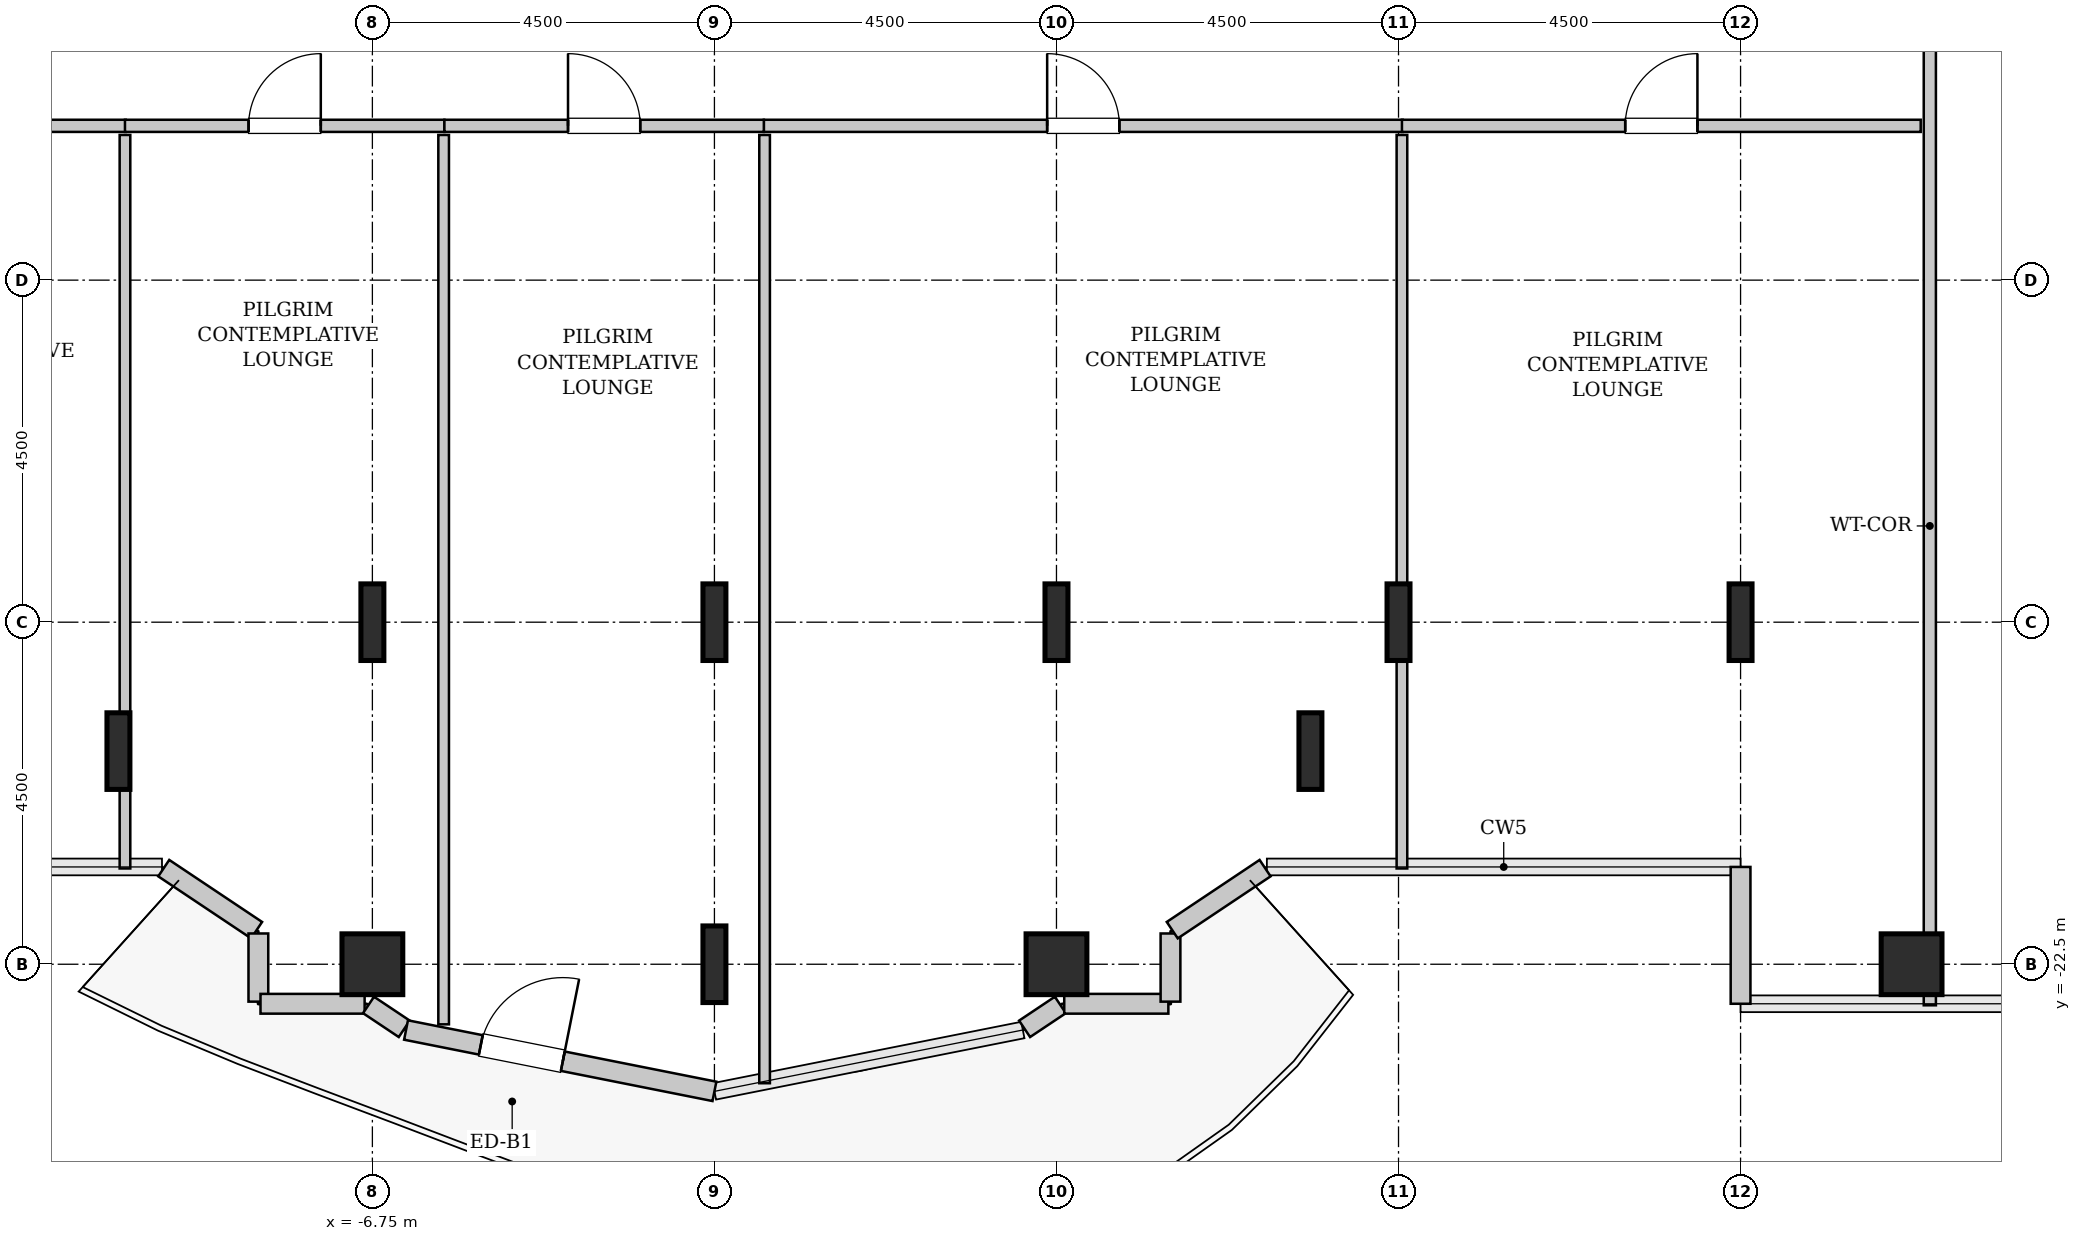
"""IFC4 building model, lengths in metres.
Left out: names, types, materials, properties, quantities, classifications, styles, units other than length and angle.
Written with IfcOpenShell. Run it as: python <this file> out.ifc"""

import sys

from ifc_helpers import new_model, si_unit, direction, frame, frame_2d, origin, origin_2d, place, context, subcontext, project, spatial, rectangle, hollow_rectangle, i_section, extrude, source, transform, mapped, element, fill, save


model = new_model("IFC4")
c1 = context("Model", 3, precision=1e-05, world=origin(), true_north=direction((0.0, 1.0)))
c2 = subcontext(c1, "Body", "Model", "MODEL_VIEW")
j1 = project(units=[si_unit("LENGTHUNIT", "METRE"), si_unit("PLANEANGLEUNIT", "RADIAN")], contexts=[c1])
p1 = place(None, origin())
s1 = spatial("IfcSite", under=j1, at=p1, CompositionType="ELEMENT")
p2 = place(p1, origin())
s2 = spatial("IfcBuilding", under=s1, at=p2, CompositionType="ELEMENT")
p3 = place(p2, frame((0.0, 0.0, 136.4)))
s3 = spatial("IfcBuildingStorey", under=s2, at=p3, CompositionType="ELEMENT", Elevation=136.4)
m1 = source(origin(), c2, "Body", "SweptSolid", [
    extrude(i_section(OverallWidth=0.302, OverallDepth=1.008, WebThickness=0.021, FlangeThickness=0.04, FilletRadius=0.03, at=origin_2d()), origin(), (0.0, 0.0, 1.0), 3.8),
])
p4 = place(p3, frame((-10.091, -19.696, 0.0), z_axis=(0.0, 0.0, 1.0), x_axis=(1.0, 0.0, 0.0)))
e1 = element("IfcColumn", 1, at=p4, inside=s3, PredefinedType="COLUMN", context=c2, shape_type="MappedRepresentation", body=[
    mapped(m1, transform((0.0, 0.0, 0.0), x_axis=(1.0, 0.0, 0.0), y_axis=(0.0, 1.0, 0.0), z_axis=(0.0, 0.0, 1.0), scale=1.0)),
])
m2 = source(origin(), c2, "Body", "SweptSolid", [
    extrude(hollow_rectangle(XDim=0.8, YDim=0.8, WallThickness=0.04, InnerFilletRadius=0.04, OuterFilletRadius=0.08, at=origin_2d()), origin(), (0.0, 0.0, 1.0), 3.8),
])
p5 = place(p3, frame((-6.75, -22.5, 0.0), z_axis=(0.0, 0.0, 1.0), x_axis=(1.0, 0.0, 0.0)))
e2 = element("IfcColumn", 2, at=p5, inside=s3, PredefinedType="COLUMN", context=c2, shape_type="MappedRepresentation", body=[
    mapped(m2, transform((0.0, 0.0, 0.0), x_axis=(1.0, 0.0, 0.0), y_axis=(0.0, 1.0, 0.0), z_axis=(0.0, 0.0, 1.0), scale=1.0)),
])
for number, where, z_axis, x_axis in (
    (3, (-6.75, -18.0, 0.0), (0.0, 0.0, 1.0), (1.0, 0.0, 0.0)),
    (4, (-2.25, -22.5, 0.0), (0.0, 0.0, 1.0), (1.0, 0.0, 0.0)),
    (5, (-2.25, -18.0, 0.0), (0.0, 0.0, 1.0), (1.0, 0.0, 0.0)),
):
    element("IfcColumn", number, at=place(p3, frame(where, z_axis=z_axis, x_axis=x_axis)), inside=s3, PredefinedType="COLUMN", context=c2, shape_type="MappedRepresentation", body=[
        mapped(m1, transform((0.0, 0.0, 0.0), x_axis=(1.0, 0.0, 0.0), y_axis=(0.0, 1.0, 0.0), z_axis=(0.0, 0.0, 1.0), scale=1.0)),
    ])
p6 = place(p3, frame((2.25, -22.5, 0.0), z_axis=(0.0, 0.0, 1.0), x_axis=(1.0, 0.0, 0.0)))
e6 = element("IfcColumn", 6, at=p6, inside=s3, PredefinedType="COLUMN", context=c2, shape_type="MappedRepresentation", body=[
    mapped(m2, transform((0.0, 0.0, 0.0), x_axis=(1.0, 0.0, 0.0), y_axis=(0.0, 1.0, 0.0), z_axis=(0.0, 0.0, 1.0), scale=1.0)),
])
for number, where, z_axis, x_axis in (
    (7, (2.25, -18.0, 0.0), (0.0, 0.0, 1.0), (1.0, 0.0, 0.0)),
    (8, (5.591, -19.696, 0.0), (0.0, 0.0, 1.0), (1.0, 0.0, 0.0)),
    (9, (6.75, -18.0, 0.0), (0.0, 0.0, 1.0), (1.0, 0.0, 0.0)),
    (10, (11.25, -18.0, 0.0), (0.0, 0.0, 1.0), (1.0, 0.0, 0.0)),
):
    element("IfcColumn", number, at=place(p3, frame(where, z_axis=z_axis, x_axis=x_axis)), inside=s3, PredefinedType="COLUMN", context=c2, shape_type="MappedRepresentation", body=[
        mapped(m1, transform((0.0, 0.0, 0.0), x_axis=(1.0, 0.0, 0.0), y_axis=(0.0, 1.0, 0.0), z_axis=(0.0, 0.0, 1.0), scale=1.0)),
    ])
p7 = place(p3, frame((13.5, -22.5, 0.0), z_axis=(0.0, 0.0, 1.0), x_axis=(1.0, 0.0, 0.0)))
e11 = element("IfcColumn", 11, at=p7, inside=s3, PredefinedType="COLUMN", context=c2, shape_type="MappedRepresentation", body=[
    mapped(m2, transform((0.0, 0.0, 0.0), x_axis=(1.0, 0.0, 0.0), y_axis=(0.0, 1.0, 0.0), z_axis=(0.0, 0.0, 1.0), scale=1.0)),
])
m3 = source(origin(), c2, "Body", "SweptSolid", [
    extrude(rectangle(XDim=1.8, YDim=0.26, at=frame_2d((0.9, 0.0))), origin(), (0.0, 0.0, 1.0), 3.55),
])
p8 = place(p3, frame((11.25, -21.22, 0.0), z_axis=(0.0, 0.0, 1.0), x_axis=(0.0, -1.0, 0.0)))
e12 = element("IfcWall", 12, at=p8, inside=s3, PredefinedType="SOLIDWALL", context=c2, shape_type="MappedRepresentation", body=[
    mapped(m3, transform((0.0, 0.0, 0.0), x_axis=(1.0, 0.0, 0.0), y_axis=(0.0, 1.0, 0.0), z_axis=(0.0, 0.0, 1.0), scale=1.0)),
])
m4 = source(origin(), c2, "Body", "SweptSolid", [
    extrude(rectangle(XDim=1.469, YDim=0.26, at=frame_2d((0.734, 0.0))), origin(), (0.0, 0.0, 1.0), 3.55),
])
p9 = place(p3, frame((-9.495, -21.236, 0.0), z_axis=(0.0, 0.0, 1.0), x_axis=(0.831461760506, -0.555581983884, 0.0)))
e13 = element("IfcWall", 13, at=p9, inside=s3, PredefinedType="SOLIDWALL", context=c2, shape_type="MappedRepresentation", body=[
    mapped(m4, transform((0.0, 0.0, 0.0), x_axis=(1.0, 0.0, 0.0), y_axis=(0.0, 1.0, 0.0), z_axis=(0.0, 0.0, 1.0), scale=1.0)),
])
m5 = source(origin(), c2, "Body", "SweptSolid", [
    extrude(rectangle(XDim=0.897, YDim=0.26, at=frame_2d((0.448, 0.0))), origin(), (0.0, 0.0, 1.0), 3.55),
])
p10 = place(p3, frame((-8.25, -22.095, 0.0), z_axis=(0.0, 0.0, 1.0), x_axis=(0.0, -1.0, 0.0)))
e14 = element("IfcWall", 14, at=p10, inside=s3, PredefinedType="SOLIDWALL", context=c2, shape_type="MappedRepresentation", body=[
    mapped(m5, transform((0.0, 0.0, 0.0), x_axis=(1.0, 0.0, 0.0), y_axis=(0.0, 1.0, 0.0), z_axis=(0.0, 0.0, 1.0), scale=1.0)),
])
m6 = source(origin(), c2, "Body", "SweptSolid", [
    extrude(rectangle(XDim=1.37, YDim=0.26, at=frame_2d((0.685, 0.0))), origin(), (0.0, 0.0, 1.0), 3.55),
])
p11 = place(p3, frame((-8.222, -23.02, 0.0), z_axis=(0.0, 0.0, 1.0), x_axis=(1.0, 0.0, 0.0)))
e15 = element("IfcWall", 15, at=p11, inside=s3, PredefinedType="SOLIDWALL", context=c2, shape_type="MappedRepresentation", body=[
    mapped(m6, transform((0.0, 0.0, 0.0), x_axis=(1.0, 0.0, 0.0), y_axis=(0.0, 1.0, 0.0), z_axis=(0.0, 0.0, 1.0), scale=1.0)),
])
m7 = source(origin(), c2, "Body", "SweptSolid", [
    extrude(rectangle(XDim=0.565, YDim=0.26, at=frame_2d((0.283, 0.0))), origin(), (0.0, 0.0, 1.0), 3.55),
])
p12 = place(p3, frame((-6.801, -23.036, 0.0), z_axis=(0.0, 0.0, 1.0), x_axis=(0.831651492666, -0.555297933317, 0.0)))
e16 = element("IfcWall", 16, at=p12, inside=s3, PredefinedType="SOLIDWALL", context=c2, shape_type="MappedRepresentation", body=[
    mapped(m7, transform((0.0, 0.0, 0.0), x_axis=(1.0, 0.0, 0.0), y_axis=(0.0, 1.0, 0.0), z_axis=(0.0, 0.0, 1.0), scale=1.0)),
])
m8 = source(origin(), c2, "Body", "SweptSolid", [
    extrude(rectangle(XDim=4.137, YDim=0.26, at=frame_2d((2.068, 0.0))), origin(), (0.0, 0.0, 1.0), 3.55),
])
p13 = place(p3, frame((-6.307, -23.365, 0.0), z_axis=(0.0, 0.0, 1.0), x_axis=(0.980782170794, -0.195105954428, 0.0)))
e17 = element("IfcWall", 17, at=p13, inside=s3, PredefinedType="SOLIDWALL", context=c2, shape_type="MappedRepresentation", body=[
    mapped(m8, transform((0.0, 0.0, 0.0), x_axis=(1.0, 0.0, 0.0), y_axis=(0.0, 1.0, 0.0), z_axis=(0.0, 0.0, 1.0), scale=1.0)),
])
p14 = place(p13, frame((1.003, 0.0, 0.0)))
e18 = element("IfcOpeningElement", 18, at=p14, cuts=e17, PredefinedType="OPENING", context=c2, shape_type="SweptSolid", body=[
    extrude(rectangle(XDim=1.1, YDim=2.2, at=frame_2d((0.55, 1.1))), frame((0.0, 0.14, 0.0), z_axis=(0.0, -1.0, 0.0), x_axis=(1.0, 0.0, 0.0)), (0.0, 0.0, 1.0), 0.28),
])
p15 = place(p3, frame((1.831, -23.35, 0.0), z_axis=(0.0, 0.0, 1.0), x_axis=(0.831651492666, 0.555297933317, 0.0)))
e19 = element("IfcWall", 19, at=p15, inside=s3, PredefinedType="SOLIDWALL", context=c2, shape_type="MappedRepresentation", body=[
    mapped(m7, transform((0.0, 0.0, 0.0), x_axis=(1.0, 0.0, 0.0), y_axis=(0.0, 1.0, 0.0), z_axis=(0.0, 0.0, 1.0), scale=1.0)),
])
p16 = place(p3, frame((2.352, -23.02, 0.0), z_axis=(0.0, 0.0, 1.0), x_axis=(1.0, 0.0, 0.0)))
e20 = element("IfcWall", 20, at=p16, inside=s3, PredefinedType="SOLIDWALL", context=c2, shape_type="MappedRepresentation", body=[
    mapped(m6, transform((0.0, 0.0, 0.0), x_axis=(1.0, 0.0, 0.0), y_axis=(0.0, 1.0, 0.0), z_axis=(0.0, 0.0, 1.0), scale=1.0)),
])
p17 = place(p3, frame((3.75, -22.992, 0.0), z_axis=(0.0, 0.0, 1.0), x_axis=(0.0, 1.0, 0.0)))
e21 = element("IfcWall", 21, at=p17, inside=s3, PredefinedType="SOLIDWALL", context=c2, shape_type="MappedRepresentation", body=[
    mapped(m5, transform((0.0, 0.0, 0.0), x_axis=(1.0, 0.0, 0.0), y_axis=(0.0, 1.0, 0.0), z_axis=(0.0, 0.0, 1.0), scale=1.0)),
])
p18 = place(p3, frame((3.773, -22.052, 0.0), z_axis=(0.0, 0.0, 1.0), x_axis=(0.831461760506, 0.555581983884, 0.0)))
e22 = element("IfcWall", 22, at=p18, inside=s3, PredefinedType="SOLIDWALL", context=c2, shape_type="MappedRepresentation", body=[
    mapped(m4, transform((0.0, 0.0, 0.0), x_axis=(1.0, 0.0, 0.0), y_axis=(0.0, 1.0, 0.0), z_axis=(0.0, 0.0, 1.0), scale=1.0)),
])
m9 = source(origin(), c2, "Body", "SweptSolid", [
    extrude(rectangle(XDim=14.545, YDim=0.16, at=frame_2d((7.272, 0.0))), origin(), (0.0, 0.0, 1.0), 3.535),
])
p19 = place(p3, frame((13.74, -23.04, 0.0), z_axis=(0.0, 0.0, 1.0), x_axis=(0.0, 1.0, 0.0)))
e23 = element("IfcWall", 23, at=p19, inside=s3, PredefinedType="PARTITIONING", context=c2, shape_type="MappedRepresentation", body=[
    mapped(m9, transform((0.0, 0.0, 0.0), x_axis=(1.0, 0.0, 0.0), y_axis=(0.0, 1.0, 0.0), z_axis=(0.0, 0.0, 1.0), scale=1.0)),
])
p20 = place(p19, frame((12.562, 0.0, 0.0)))
e24 = element("IfcOpeningElement", 24, at=p20, cuts=e23, PredefinedType="OPENING", context=c2, shape_type="SweptSolid", body=[
    extrude(rectangle(XDim=0.95, YDim=2.1, at=frame_2d((0.475, 1.05))), frame((0.0, 0.09, 0.0), z_axis=(0.0, -1.0, 0.0), x_axis=(1.0, 0.0, 0.0)), (0.0, 0.0, 1.0), 0.18),
])
m10 = source(origin(), c2, "Body", "SweptSolid", [
    extrude(rectangle(XDim=3.625, YDim=0.16, at=frame_2d((1.812, 0.0))), origin(), (0.0, 0.0, 1.0), 3.535),
])
p21 = place(p3, frame((-13.62, -11.47, 0.0), z_axis=(0.0, 0.0, 1.0), x_axis=(1.0, 0.0, 0.0)))
e25 = element("IfcWall", 25, at=p21, inside=s3, PredefinedType="PARTITIONING", context=c2, shape_type="MappedRepresentation", body=[
    mapped(m10, transform((0.0, 0.0, 0.0), x_axis=(1.0, 0.0, 0.0), y_axis=(0.0, 1.0, 0.0), z_axis=(0.0, 0.0, 1.0), scale=1.0)),
])
p22 = place(p21, frame((1.337, 0.0, 0.0)))
e26 = element("IfcOpeningElement", 26, at=p22, cuts=e25, PredefinedType="OPENING", context=c2, shape_type="SweptSolid", body=[
    extrude(rectangle(XDim=0.95, YDim=2.1, at=frame_2d((0.475, 1.05))), frame((0.0, 0.09, 0.0), z_axis=(0.0, -1.0, 0.0), x_axis=(1.0, 0.0, 0.0)), (0.0, 0.0, 1.0), 0.18),
])
m11 = source(origin(), c2, "Body", "SweptSolid", [
    extrude(rectangle(XDim=9.65, YDim=0.14, at=frame_2d((4.825, 0.0))), origin(), (0.0, 0.0, 1.0), 3.535),
])
p23 = place(p3, frame((-10.005, -21.24, 0.0), z_axis=(0.0, 0.0, 1.0), x_axis=(0.0, 1.0, 0.0)))
e27 = element("IfcWall", 27, at=p23, inside=s3, PredefinedType="PARTITIONING", context=c2, shape_type="MappedRepresentation", body=[
    mapped(m11, transform((0.0, 0.0, 0.0), x_axis=(1.0, 0.0, 0.0), y_axis=(0.0, 1.0, 0.0), z_axis=(0.0, 0.0, 1.0), scale=1.0)),
])
m12 = source(origin(), c2, "Body", "SweptSolid", [
    extrude(rectangle(XDim=8.405, YDim=0.16, at=frame_2d((4.203, 0.0))), origin(), (0.0, 0.0, 1.0), 3.535),
])
p24 = place(p3, frame((-1.6, -11.47, 0.0), z_axis=(0.0, 0.0, 1.0), x_axis=(1.0, 0.0, 0.0)))
e28 = element("IfcWall", 28, at=p24, inside=s3, PredefinedType="PARTITIONING", context=c2, shape_type="MappedRepresentation", body=[
    mapped(m12, transform((0.0, 0.0, 0.0), x_axis=(1.0, 0.0, 0.0), y_axis=(0.0, 1.0, 0.0), z_axis=(0.0, 0.0, 1.0), scale=1.0)),
])
p25 = place(p24, frame((3.728, 0.0, 0.0)))
e29 = element("IfcOpeningElement", 29, at=p25, cuts=e28, PredefinedType="OPENING", context=c2, shape_type="SweptSolid", body=[
    extrude(rectangle(XDim=0.95, YDim=2.1, at=frame_2d((0.475, 1.05))), frame((0.0, 0.09, 0.0), z_axis=(0.0, -1.0, 0.0), x_axis=(1.0, 0.0, 0.0)), (0.0, 0.0, 1.0), 0.18),
])
m13 = source(origin(), c2, "Body", "SweptSolid", [
    extrude(rectangle(XDim=12.475, YDim=0.14, at=frame_2d((6.238, 0.0))), origin(), (0.0, 0.0, 1.0), 3.535),
])
p26 = place(p3, frame((-1.59, -24.065, 0.0), z_axis=(0.0, 0.0, 1.0), x_axis=(0.0, 1.0, 0.0)))
e30 = element("IfcWall", 30, at=p26, inside=s3, PredefinedType="PARTITIONING", context=c2, shape_type="MappedRepresentation", body=[
    mapped(m13, transform((0.0, 0.0, 0.0), x_axis=(1.0, 0.0, 0.0), y_axis=(0.0, 1.0, 0.0), z_axis=(0.0, 0.0, 1.0), scale=1.0)),
])
p27 = place(p3, frame((6.795, -21.24, 0.0), z_axis=(0.0, 0.0, 1.0), x_axis=(0.0, 1.0, 0.0)))
e31 = element("IfcWall", 31, at=p27, inside=s3, PredefinedType="PARTITIONING", context=c2, shape_type="MappedRepresentation", body=[
    mapped(m11, transform((0.0, 0.0, 0.0), x_axis=(1.0, 0.0, 0.0), y_axis=(0.0, 1.0, 0.0), z_axis=(0.0, 0.0, 1.0), scale=1.0)),
])
m14 = source(origin(), c2, "Body", "SweptSolid", [
    extrude(rectangle(XDim=4.202, YDim=0.16, at=frame_2d((2.101, 0.0))), origin(), (0.0, 0.0, 1.0), 3.535),
])
p28 = place(p3, frame((-10.005, -11.47, 0.0), z_axis=(0.0, 0.0, 1.0), x_axis=(1.0, 0.0, 0.0)))
e32 = element("IfcWall", 32, at=p28, inside=s3, PredefinedType="PARTITIONING", context=c2, shape_type="MappedRepresentation", body=[
    mapped(m14, transform((0.0, 0.0, 0.0), x_axis=(1.0, 0.0, 0.0), y_axis=(0.0, 1.0, 0.0), z_axis=(0.0, 0.0, 1.0), scale=1.0)),
])
p29 = place(p28, frame((1.626, 0.0, 0.0)))
e33 = element("IfcOpeningElement", 33, at=p29, cuts=e32, PredefinedType="OPENING", context=c2, shape_type="SweptSolid", body=[
    extrude(rectangle(XDim=0.95, YDim=2.1, at=frame_2d((0.475, 1.05))), frame((0.0, 0.09, 0.0), z_axis=(0.0, -1.0, 0.0), x_axis=(1.0, 0.0, 0.0)), (0.0, 0.0, 1.0), 0.18),
])
m15 = source(origin(), c2, "Body", "SweptSolid", [
    extrude(rectangle(XDim=11.7, YDim=0.14, at=frame_2d((5.85, 0.0))), origin(), (0.0, 0.0, 1.0), 3.535),
])
p30 = place(p3, frame((-5.812, -23.291, 0.0), z_axis=(0.0, 0.0, 1.0), x_axis=(0.0, 1.0, 0.0)))
e34 = element("IfcWall", 34, at=p30, inside=s3, PredefinedType="PARTITIONING", context=c2, shape_type="MappedRepresentation", body=[
    mapped(m15, transform((0.0, 0.0, 0.0), x_axis=(1.0, 0.0, 0.0), y_axis=(0.0, 1.0, 0.0), z_axis=(0.0, 0.0, 1.0), scale=1.0)),
])
p31 = place(p3, frame((-5.802, -11.47, 0.0), z_axis=(0.0, 0.0, 1.0), x_axis=(1.0, 0.0, 0.0)))
e35 = element("IfcWall", 35, at=p31, inside=s3, PredefinedType="PARTITIONING", context=c2, shape_type="MappedRepresentation", body=[
    mapped(m14, transform((0.0, 0.0, 0.0), x_axis=(1.0, 0.0, 0.0), y_axis=(0.0, 1.0, 0.0), z_axis=(0.0, 0.0, 1.0), scale=1.0)),
])
p32 = place(p31, frame((1.626, 0.0, 0.0)))
e36 = element("IfcOpeningElement", 36, at=p32, cuts=e35, PredefinedType="OPENING", context=c2, shape_type="SweptSolid", body=[
    extrude(rectangle(XDim=0.95, YDim=2.1, at=frame_2d((0.475, 1.05))), frame((0.0, 0.09, 0.0), z_axis=(0.0, -1.0, 0.0), x_axis=(1.0, 0.0, 0.0)), (0.0, 0.0, 1.0), 0.18),
])
m16 = source(origin(), c2, "Body", "SweptSolid", [
    extrude(rectangle(XDim=6.825, YDim=0.16, at=frame_2d((3.413, 0.0))), origin(), (0.0, 0.0, 1.0), 3.535),
])
p33 = place(p3, frame((6.795, -11.47, 0.0), z_axis=(0.0, 0.0, 1.0), x_axis=(1.0, 0.0, 0.0)))
e37 = element("IfcWall", 37, at=p33, inside=s3, PredefinedType="PARTITIONING", context=c2, shape_type="MappedRepresentation", body=[
    mapped(m16, transform((0.0, 0.0, 0.0), x_axis=(1.0, 0.0, 0.0), y_axis=(0.0, 1.0, 0.0), z_axis=(0.0, 0.0, 1.0), scale=1.0)),
])
p34 = place(p33, frame((2.938, 0.0, 0.0)))
e38 = element("IfcOpeningElement", 38, at=p34, cuts=e37, PredefinedType="OPENING", context=c2, shape_type="SweptSolid", body=[
    extrude(rectangle(XDim=0.95, YDim=2.1, at=frame_2d((0.475, 1.05))), frame((0.0, 0.09, 0.0), z_axis=(0.0, -1.0, 0.0), x_axis=(1.0, 0.0, 0.0)), (0.0, 0.0, 1.0), 0.18),
])
m17 = source(origin(), c2, "Body", "SweptSolid", [
    extrude(rectangle(XDim=1.1, YDim=2.2, at=frame_2d((0.55, 1.1))), frame((0.0, 0.025, 0.0), z_axis=(0.0, -1.0, 0.0), x_axis=(1.0, 0.0, 0.0)), (0.0, 0.0, 1.0), 0.05),
])
p35 = place(p14, origin())
e39 = element("IfcDoor", 39, at=p35, inside=s3, OperationType="SINGLE_SWING_RIGHT", PredefinedType="DOOR", context=c2, shape_type="MappedRepresentation", body=[
    mapped(m17, transform((0.0, 0.0, 0.0), x_axis=(1.0, 0.0, 0.0), y_axis=(0.0, 1.0, 0.0), z_axis=(0.0, 0.0, 1.0), scale=1.0)),
])
fill(e18, e39)
m18 = source(origin(), c2, "Body", "SweptSolid", [
    extrude(rectangle(XDim=0.95, YDim=2.1, at=frame_2d((0.475, 1.05))), frame((0.0, 0.025, 0.0), z_axis=(0.0, -1.0, 0.0), x_axis=(1.0, 0.0, 0.0)), (0.0, 0.0, 1.0), 0.05),
])
p36 = place(p25, origin())
e40 = element("IfcDoor", 40, at=p36, inside=s3, OperationType="SINGLE_SWING_LEFT", PredefinedType="DOOR", context=c2, shape_type="MappedRepresentation", body=[
    mapped(m18, transform((0.0, 0.0, 0.0), x_axis=(1.0, 0.0, 0.0), y_axis=(0.0, 1.0, 0.0), z_axis=(0.0, 0.0, 1.0), scale=1.0)),
])
fill(e29, e40)
p37 = place(p29, origin())
e41 = element("IfcDoor", 41, at=p37, inside=s3, OperationType="SINGLE_SWING_RIGHT", PredefinedType="DOOR", context=c2, shape_type="MappedRepresentation", body=[
    mapped(m18, transform((0.0, 0.0, 0.0), x_axis=(1.0, 0.0, 0.0), y_axis=(0.0, 1.0, 0.0), z_axis=(0.0, 0.0, 1.0), scale=1.0)),
])
fill(e33, e41)
p38 = place(p32, origin())
e42 = element("IfcDoor", 42, at=p38, inside=s3, OperationType="SINGLE_SWING_LEFT", PredefinedType="DOOR", context=c2, shape_type="MappedRepresentation", body=[
    mapped(m18, transform((0.0, 0.0, 0.0), x_axis=(1.0, 0.0, 0.0), y_axis=(0.0, 1.0, 0.0), z_axis=(0.0, 0.0, 1.0), scale=1.0)),
])
fill(e36, e42)
p39 = place(p34, origin())
e43 = element("IfcDoor", 43, at=p39, inside=s3, OperationType="SINGLE_SWING_RIGHT", PredefinedType="DOOR", context=c2, shape_type="MappedRepresentation", body=[
    mapped(m18, transform((0.0, 0.0, 0.0), x_axis=(1.0, 0.0, 0.0), y_axis=(0.0, 1.0, 0.0), z_axis=(0.0, 0.0, 1.0), scale=1.0)),
])
fill(e38, e43)
save(model, sys.argv[1])
